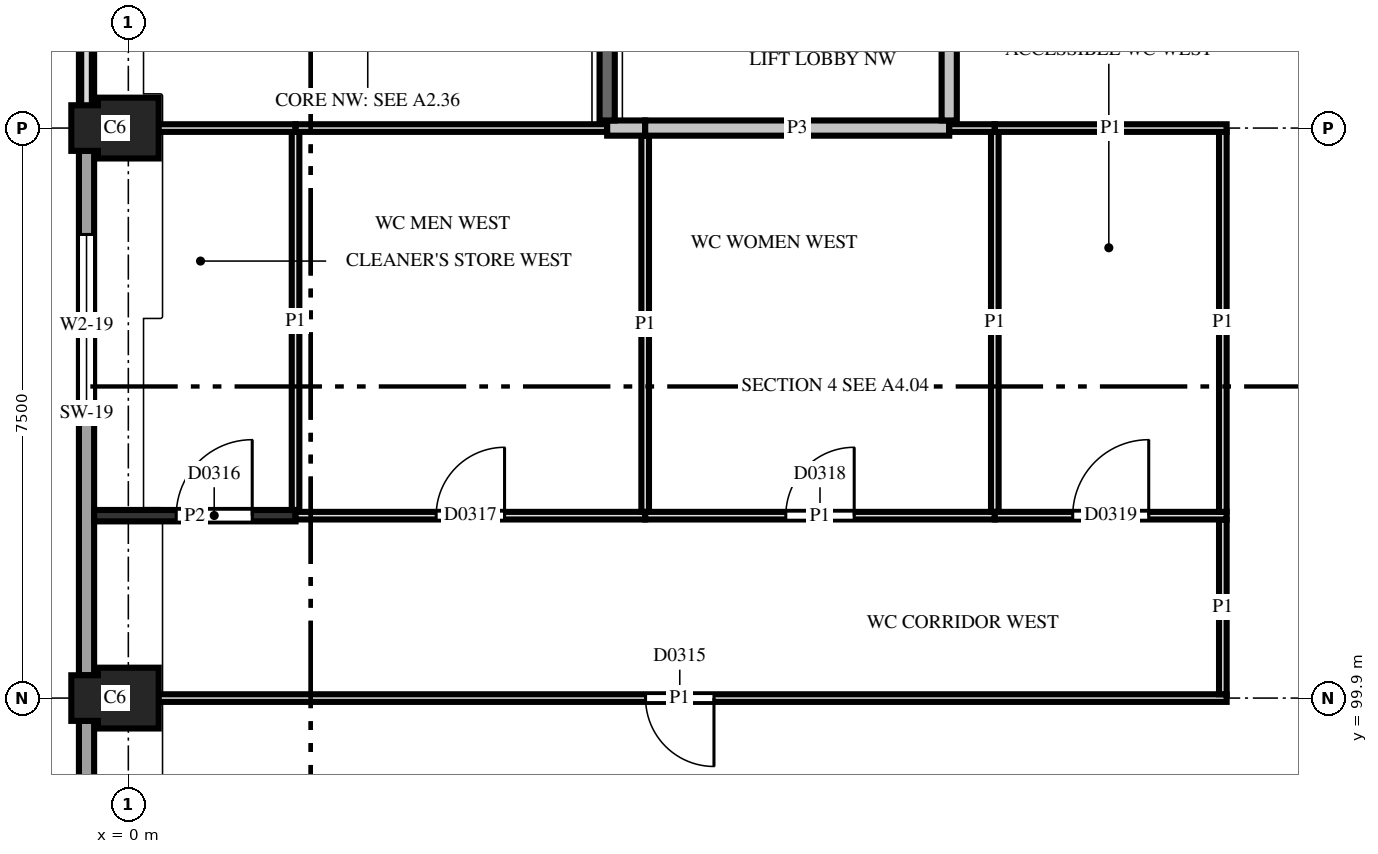
"""IFC4 building model, lengths in metres.
Left out: names, types, materials, properties, quantities, classifications, styles, units other than length and angle.
Written with IfcOpenShell. Run it as: python <this file> out.ifc"""

import sys

from ifc_helpers import new_model, si_unit, direction, frame, frame_2d, origin, place, context, subcontext, project, spatial, polyline, rectangle, outline, extrude, element, fill, save


model = new_model("IFC4")
c1 = context("Model", 3, precision=1e-05, world=origin(), true_north=direction((0.0, 1.0)))
c2 = subcontext(c1, "Body", "Model", "MODEL_VIEW")
j1 = project(units=[si_unit("LENGTHUNIT", "METRE"), si_unit("PLANEANGLEUNIT", "RADIAN")], contexts=[c1])
p1 = place(None, origin())
s1 = spatial("IfcSite", under=j1, at=p1, CompositionType="ELEMENT")
p2 = place(p1, origin())
s2 = spatial("IfcBuilding", under=s1, at=p2, CompositionType="ELEMENT")
p3 = place(p2, frame((0.0, 0.0, 11.9)))
s3 = spatial("IfcBuildingStorey", under=s2, at=p3, CompositionType="ELEMENT", Elevation=11.9)
for number, where, z_axis, x_axis in (
    (1, (0.0, 99.9, 0.0), (0.0, 0.0, 1.0), (-1.0, 0.0, 0.0)),
    (2, (0.0, 107.4, 0.0), (0.0, 0.0, 1.0), (-1.0, 0.0, 0.0)),
):
    element("IfcColumn", number, at=place(p3, frame(where, z_axis=z_axis, x_axis=x_axis)), inside=s3, PredefinedType="COLUMN", context=c2, shape_type="SweptSolid", body=[
        extrude(outline(polyline([(-0.4, -0.4), (0.4, -0.4), (0.4, -0.3), (0.75, -0.3), (0.75, 0.3), (0.4, 0.3), (0.4, 0.4), (-0.4, 0.4), (-0.4, -0.4)])), origin(), (0.0, 0.0, 1.0), 3.7),
    ])
p4 = place(p3, frame((-0.55, 114.6, 0.0), z_axis=(0.0, 0.0, 1.0), x_axis=(0.0, -1.0, 0.0)))
e3 = element("IfcWall", 3, at=p4, inside=s3, PredefinedType="SOLIDWALL", context=c2, shape_type="SweptSolid", body=[
    extrude(rectangle(XDim=6.9, YDim=0.2, at=frame_2d((3.45, 0.0))), origin(), (0.0, 0.0, 1.0), 2.3),
])
p5 = place(p3, frame((-0.55, 107.1, 0.0), z_axis=(0.0, 0.0, 1.0), x_axis=(0.0, -1.0, 0.0)))
e4 = element("IfcWall", 4, at=p5, inside=s3, PredefinedType="SOLIDWALL", context=c2, shape_type="SweptSolid", body=[
    extrude(rectangle(XDim=6.9, YDim=0.2, at=frame_2d((3.45, 0.0))), origin(), (0.0, 0.0, 1.0), 2.3),
])
p6 = place(p5, frame((1.1, 0.0, 0.55)))
e5 = element("IfcOpeningElement", 5, at=p6, cuts=e4, PredefinedType="OPENING", context=c2, shape_type="SweptSolid", body=[
    extrude(rectangle(XDim=2.4, YDim=1.0, at=frame_2d((1.2, 0.5))), frame((0.0, 0.11, 0.0), z_axis=(0.0, -1.0, 0.0), x_axis=(1.0, 0.0, 0.0)), (0.0, 0.0, 1.0), 0.22),
])
p7 = place(p3, frame((-0.55, 99.6, 0.0), z_axis=(0.0, 0.0, 1.0), x_axis=(0.0, -1.0, 0.0)))
e6 = element("IfcWall", 6, at=p7, inside=s3, PredefinedType="SOLIDWALL", context=c2, shape_type="SweptSolid", body=[
    extrude(rectangle(XDim=6.9, YDim=0.2, at=frame_2d((3.45, 0.0))), origin(), (0.0, 0.0, 1.0), 2.3),
])
p8 = place(p7, frame((2.25, 0.0, 0.55)))
e7 = element("IfcOpeningElement", 7, at=p8, cuts=e6, PredefinedType="OPENING", context=c2, shape_type="SweptSolid", body=[
    extrude(rectangle(XDim=2.4, YDim=1.0, at=frame_2d((1.2, 0.5))), frame((0.0, 0.11, 0.0), z_axis=(0.0, -1.0, 0.0), x_axis=(1.0, 0.0, 0.0)), (0.0, 0.0, 1.0), 0.22),
])
p9 = place(p3, frame((0.06, 99.9, 0.0), z_axis=(0.0, 0.0, 1.0), x_axis=(1.0, 0.0, 0.0)))
e8 = element("IfcWall", 8, at=p9, inside=s3, PredefinedType="PARTITIONING", context=c2, shape_type="SweptSolid", body=[
    extrude(rectangle(XDim=14.39, YDim=0.1, at=frame_2d((7.195, 0.0))), origin(), (0.0, 0.0, 1.0), 2.88),
])
p10 = place(p9, frame((6.745, 0.0, 0.0)))
e9 = element("IfcOpeningElement", 9, at=p10, cuts=e8, PredefinedType="OPENING", context=c2, shape_type="SweptSolid", body=[
    extrude(rectangle(XDim=0.9, YDim=2.1, at=frame_2d((0.45, 1.05))), frame((0.0, 0.06, 0.0), z_axis=(0.0, -1.0, 0.0), x_axis=(1.0, 0.0, 0.0)), (0.0, 0.0, 1.0), 0.12),
])
p11 = place(p3, frame((14.4, 99.95, 0.0), z_axis=(0.0, 0.0, 1.0), x_axis=(0.0, 1.0, 0.0)))
e10 = element("IfcWall", 10, at=p11, inside=s3, PredefinedType="PARTITIONING", context=c2, shape_type="SweptSolid", body=[
    extrude(rectangle(XDim=2.3, YDim=0.1, at=frame_2d((1.15, 0.0))), origin(), (0.0, 0.0, 1.0), 2.88),
])
p12 = place(p3, frame((2.2, 102.3, 0.0), z_axis=(0.0, 0.0, 1.0), x_axis=(-1.0, 0.0, 0.0)))
e11 = element("IfcWall", 11, at=p12, inside=s3, PredefinedType="PARTITIONING", context=c2, shape_type="SweptSolid", body=[
    extrude(rectangle(XDim=2.65, YDim=0.15, at=frame_2d((1.325, 0.0))), origin(), (0.0, 0.0, 1.0), 2.88),
])
p13 = place(p12, frame((0.57, 0.0, 0.0)))
e12 = element("IfcOpeningElement", 12, at=p13, cuts=e11, PredefinedType="OPENING", context=c2, shape_type="SweptSolid", body=[
    extrude(rectangle(XDim=1.0, YDim=2.1, at=frame_2d((0.5, 1.05))), frame((0.0, 0.085, 0.0), z_axis=(0.0, -1.0, 0.0), x_axis=(1.0, 0.0, 0.0)), (0.0, 0.0, 1.0), 0.17),
])
p14 = place(p3, frame((2.2, 102.375, 0.0), z_axis=(0.0, 0.0, 1.0), x_axis=(0.0, 1.0, 0.0)))
e13 = element("IfcWall", 13, at=p14, inside=s3, PredefinedType="PARTITIONING", context=c2, shape_type="SweptSolid", body=[
    extrude(rectangle(XDim=4.975, YDim=0.1, at=frame_2d((2.488, 0.0))), origin(), (0.0, 0.0, 1.0), 2.88),
])
p15 = place(p3, frame((6.8, 102.3, 0.0), z_axis=(0.0, 0.0, 1.0), x_axis=(-1.0, 0.0, 0.0)))
e14 = element("IfcWall", 14, at=p15, inside=s3, PredefinedType="PARTITIONING", context=c2, shape_type="SweptSolid", body=[
    extrude(rectangle(XDim=4.6, YDim=0.1, at=frame_2d((2.3, 0.0))), origin(), (0.0, 0.0, 1.0), 2.88),
])
p16 = place(p15, frame((1.85, 0.0, 0.0)))
e15 = element("IfcOpeningElement", 15, at=p16, cuts=e14, PredefinedType="OPENING", context=c2, shape_type="SweptSolid", body=[
    extrude(rectangle(XDim=0.9, YDim=2.1, at=frame_2d((0.45, 1.05))), frame((0.0, 0.06, 0.0), z_axis=(0.0, -1.0, 0.0), x_axis=(1.0, 0.0, 0.0)), (0.0, 0.0, 1.0), 0.12),
])
p17 = place(p3, frame((6.8, 102.35, 0.0), z_axis=(0.0, 0.0, 1.0), x_axis=(0.0, 1.0, 0.0)))
e16 = element("IfcWall", 16, at=p17, inside=s3, PredefinedType="PARTITIONING", context=c2, shape_type="SweptSolid", body=[
    extrude(rectangle(XDim=4.95, YDim=0.1, at=frame_2d((2.475, 0.0))), origin(), (0.0, 0.0, 1.0), 2.88),
])
p18 = place(p3, frame((11.4, 102.3, 0.0), z_axis=(0.0, 0.0, 1.0), x_axis=(-1.0, 0.0, 0.0)))
e17 = element("IfcWall", 17, at=p18, inside=s3, PredefinedType="PARTITIONING", context=c2, shape_type="SweptSolid", body=[
    extrude(rectangle(XDim=4.6, YDim=0.1, at=frame_2d((2.3, 0.0))), origin(), (0.0, 0.0, 1.0), 2.88),
])
p19 = place(p18, frame((1.85, 0.0, 0.0)))
e18 = element("IfcOpeningElement", 18, at=p19, cuts=e17, PredefinedType="OPENING", context=c2, shape_type="SweptSolid", body=[
    extrude(rectangle(XDim=0.9, YDim=2.1, at=frame_2d((0.45, 1.05))), frame((0.0, 0.06, 0.0), z_axis=(0.0, -1.0, 0.0), x_axis=(1.0, 0.0, 0.0)), (0.0, 0.0, 1.0), 0.12),
])
p20 = place(p3, frame((11.4, 102.35, 0.0), z_axis=(0.0, 0.0, 1.0), x_axis=(0.0, 1.0, 0.0)))
e19 = element("IfcWall", 19, at=p20, inside=s3, PredefinedType="PARTITIONING", context=c2, shape_type="SweptSolid", body=[
    extrude(rectangle(XDim=5.0, YDim=0.1, at=frame_2d((2.5, 0.0))), origin(), (0.0, 0.0, 1.0), 2.88),
])
p21 = place(p3, frame((14.45, 102.3, 0.0), z_axis=(0.0, 0.0, 1.0), x_axis=(-1.0, 0.0, 0.0)))
e20 = element("IfcWall", 20, at=p21, inside=s3, PredefinedType="PARTITIONING", context=c2, shape_type="SweptSolid", body=[
    extrude(rectangle(XDim=3.05, YDim=0.1, at=frame_2d((1.525, 0.0))), origin(), (0.0, 0.0, 1.0), 2.88),
])
p22 = place(p21, frame((1.025, 0.0, 0.0)))
e21 = element("IfcOpeningElement", 21, at=p22, cuts=e20, PredefinedType="OPENING", context=c2, shape_type="SweptSolid", body=[
    extrude(rectangle(XDim=1.0, YDim=2.1, at=frame_2d((0.5, 1.05))), frame((0.0, 0.06, 0.0), z_axis=(0.0, -1.0, 0.0), x_axis=(1.0, 0.0, 0.0)), (0.0, 0.0, 1.0), 0.12),
])
p23 = place(p3, frame((14.4, 102.35, 0.0), z_axis=(0.0, 0.0, 1.0), x_axis=(0.0, 1.0, 0.0)))
e22 = element("IfcWall", 22, at=p23, inside=s3, PredefinedType="PARTITIONING", context=c2, shape_type="SweptSolid", body=[
    extrude(rectangle(XDim=5.0, YDim=0.1, at=frame_2d((2.5, 0.0))), origin(), (0.0, 0.0, 1.0), 2.88),
])
p24 = place(p3, frame((2.2, 107.4, 0.0), z_axis=(0.0, 0.0, 1.0), x_axis=(-1.0, 0.0, 0.0)))
e23 = element("IfcWall", 23, at=p24, inside=s3, PredefinedType="PARTITIONING", context=c2, shape_type="SweptSolid", body=[
    extrude(rectangle(XDim=2.14, YDim=0.1, at=frame_2d((1.07, 0.0))), origin(), (0.0, 0.0, 1.0), 2.88),
])
p25 = place(p3, frame((6.3, 107.4, 0.0), z_axis=(0.0, 0.0, 1.0), x_axis=(-1.0, 0.0, 0.0)))
e24 = element("IfcWall", 24, at=p25, inside=s3, PredefinedType="PARTITIONING", context=c2, shape_type="SweptSolid", body=[
    extrude(rectangle(XDim=4.1, YDim=0.1, at=frame_2d((2.05, 0.0))), origin(), (0.0, 0.0, 1.0), 2.88),
])
p26 = place(p3, frame((6.3, 107.4, 0.0), z_axis=(0.0, 0.0, 1.0), x_axis=(1.0, 0.0, 0.0)))
e25 = element("IfcWall", 25, at=p26, inside=s3, PredefinedType="PARTITIONING", context=c2, shape_type="SweptSolid", body=[
    extrude(rectangle(XDim=0.5, YDim=0.2, at=frame_2d((0.25, 0.0))), origin(), (0.0, 0.0, 1.0), 2.88),
])
p27 = place(p3, frame((6.8, 107.4, 0.0), z_axis=(0.0, 0.0, 1.0), x_axis=(1.0, 0.0, 0.0)))
e26 = element("IfcWall", 26, at=p27, inside=s3, PredefinedType="PARTITIONING", context=c2, shape_type="SweptSolid", body=[
    extrude(rectangle(XDim=4.0, YDim=0.2, at=frame_2d((2.0, 0.0))), origin(), (0.0, 0.0, 1.0), 2.88),
])
p28 = place(p3, frame((10.8, 107.5, 0.0), z_axis=(0.0, 0.0, 1.0), x_axis=(0.0, 1.0, 0.0)))
e27 = element("IfcWall", 27, at=p28, inside=s3, PredefinedType="PARTITIONING", context=c2, shape_type="SweptSolid", body=[
    extrude(rectangle(XDim=7.85, YDim=0.2, at=frame_2d((3.925, 0.0))), origin(), (0.0, 0.0, 1.0), 2.88),
])
p29 = place(p28, frame((3.17, 0.0, 0.0)))
e28 = element("IfcOpeningElement", 28, at=p29, cuts=e27, PredefinedType="OPENING", context=c2, shape_type="SweptSolid", body=[
    extrude(rectangle(XDim=1.0, YDim=2.1, at=frame_2d((0.5, 1.05))), frame((0.0, 0.11, 0.0), z_axis=(0.0, -1.0, 0.0), x_axis=(1.0, 0.0, 0.0)), (0.0, 0.0, 1.0), 0.22),
])
p30 = place(p3, frame((11.4, 107.4, 0.0), z_axis=(0.0, 0.0, 1.0), x_axis=(-1.0, 0.0, 0.0)))
e29 = element("IfcWall", 29, at=p30, inside=s3, PredefinedType="PARTITIONING", context=c2, shape_type="SweptSolid", body=[
    extrude(rectangle(XDim=0.6, YDim=0.1, at=frame_2d((0.3, 0.0))), origin(), (0.0, 0.0, 1.0), 2.88),
])
p31 = place(p3, frame((14.45, 107.4, 0.0), z_axis=(0.0, 0.0, 1.0), x_axis=(-1.0, 0.0, 0.0)))
e30 = element("IfcWall", 30, at=p31, inside=s3, PredefinedType="PARTITIONING", context=c2, shape_type="SweptSolid", body=[
    extrude(rectangle(XDim=3.05, YDim=0.1, at=frame_2d((1.525, 0.0))), origin(), (0.0, 0.0, 1.0), 2.88),
])
p32 = place(p3, frame((6.3, 111.225, 0.0), z_axis=(0.0, 0.0, 1.0), x_axis=(0.0, -1.0, 0.0)))
e31 = element("IfcWall", 31, at=p32, inside=s3, PredefinedType="PARTITIONING", context=c2, shape_type="SweptSolid", body=[
    extrude(rectangle(XDim=3.725, YDim=0.2, at=frame_2d((1.863, 0.0))), origin(), (0.0, 0.0, 1.0), 2.88),
])
p33 = place(p32, frame((1.363, 0.0, 0.0)))
e32 = element("IfcOpeningElement", 32, at=p33, cuts=e31, PredefinedType="OPENING", context=c2, shape_type="SweptSolid", body=[
    extrude(rectangle(XDim=1.0, YDim=2.1, at=frame_2d((0.5, 1.05))), frame((0.0, 0.11, 0.0), z_axis=(0.0, -1.0, 0.0), x_axis=(1.0, 0.0, 0.0)), (0.0, 0.0, 1.0), 0.22),
])
p34 = place(p6, origin())
e33 = element("IfcWindow", 33, at=p34, inside=s3, PartitioningType="SINGLE_PANEL", PredefinedType="WINDOW", context=c2, shape_type="SweptSolid", body=[
    extrude(rectangle(XDim=2.4, YDim=1.0, at=frame_2d((1.2, 0.5))), frame((0.0, 0.03, 0.0), z_axis=(0.0, -1.0, 0.0), x_axis=(1.0, 0.0, 0.0)), (0.0, 0.0, 1.0), 0.06),
])
fill(e5, e33)
p35 = place(p10, origin())
e34 = element("IfcDoor", 34, at=p35, inside=s3, OperationType="SINGLE_SWING_RIGHT", PredefinedType="DOOR", context=c2, shape_type="SweptSolid", body=[
    extrude(rectangle(XDim=0.9, YDim=2.1, at=frame_2d((0.45, 1.05))), frame((0.0, 0.025, 0.0), z_axis=(0.0, -1.0, 0.0), x_axis=(1.0, 0.0, 0.0)), (0.0, 0.0, 1.0), 0.05),
])
fill(e9, e34)
p36 = place(p13, origin())
e35 = element("IfcDoor", 35, at=p36, inside=s3, OperationType="SINGLE_SWING_LEFT", PredefinedType="DOOR", context=c2, shape_type="SweptSolid", body=[
    extrude(rectangle(XDim=1.0, YDim=2.1, at=frame_2d((0.5, 1.05))), frame((0.0, 0.025, 0.0), z_axis=(0.0, -1.0, 0.0), x_axis=(1.0, 0.0, 0.0)), (0.0, 0.0, 1.0), 0.05),
])
fill(e12, e35)
p37 = place(p16, origin())
e36 = element("IfcDoor", 36, at=p37, inside=s3, OperationType="SINGLE_SWING_LEFT", PredefinedType="DOOR", context=c2, shape_type="SweptSolid", body=[
    extrude(rectangle(XDim=0.9, YDim=2.1, at=frame_2d((0.45, 1.05))), frame((0.0, 0.025, 0.0), z_axis=(0.0, -1.0, 0.0), x_axis=(1.0, 0.0, 0.0)), (0.0, 0.0, 1.0), 0.05),
])
fill(e15, e36)
p38 = place(p19, origin())
e37 = element("IfcDoor", 37, at=p38, inside=s3, OperationType="SINGLE_SWING_LEFT", PredefinedType="DOOR", context=c2, shape_type="SweptSolid", body=[
    extrude(rectangle(XDim=0.9, YDim=2.1, at=frame_2d((0.45, 1.05))), frame((0.0, 0.025, 0.0), z_axis=(0.0, -1.0, 0.0), x_axis=(1.0, 0.0, 0.0)), (0.0, 0.0, 1.0), 0.05),
])
fill(e18, e37)
p39 = place(p22, origin())
e38 = element("IfcDoor", 38, at=p39, inside=s3, OperationType="SINGLE_SWING_LEFT", PredefinedType="DOOR", context=c2, shape_type="SweptSolid", body=[
    extrude(rectangle(XDim=1.0, YDim=2.1, at=frame_2d((0.5, 1.05))), frame((0.0, 0.025, 0.0), z_axis=(0.0, -1.0, 0.0), x_axis=(1.0, 0.0, 0.0)), (0.0, 0.0, 1.0), 0.05),
])
fill(e21, e38)
save(model, sys.argv[1])
